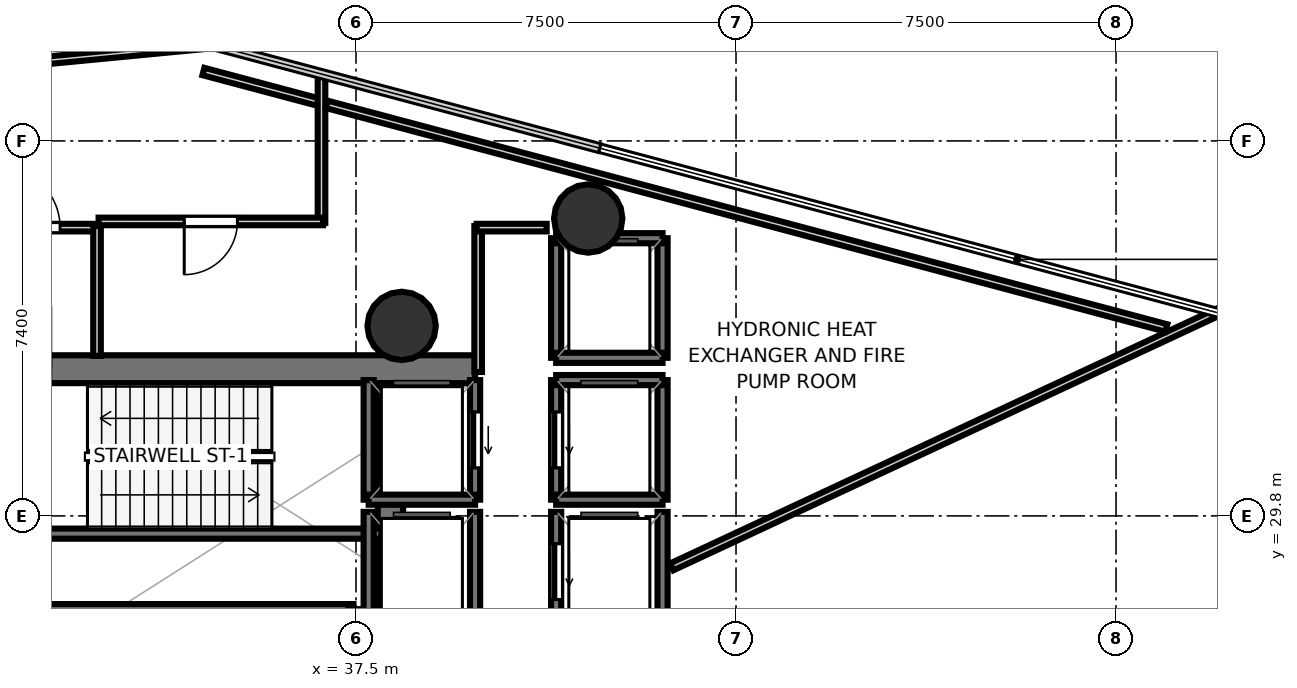
"""IFC4 building model, lengths in metres.
Left out: names, types, materials, properties, quantities, classifications, styles, units other than length and angle.
Written with IfcOpenShell. Run it as: python <this file> out.ifc"""

import sys

from ifc_helpers import new_model, si_unit, direction, frame, frame_2d, origin, origin_2d, place, context, subcontext, project, spatial, rectangle, hollow_circle, extrude, element, fill, save


model = new_model("IFC4")
c1 = context("Model", 3, precision=1e-05, world=origin(), true_north=direction((0.0, 1.0)))
c2 = subcontext(c1, "Body", "Model", "MODEL_VIEW")
j1 = project(units=[si_unit("LENGTHUNIT", "METRE"), si_unit("PLANEANGLEUNIT", "RADIAN")], contexts=[c1])
p1 = place(None, origin())
s1 = spatial("IfcSite", under=j1, at=p1, CompositionType="ELEMENT")
p2 = place(p1, origin())
s2 = spatial("IfcBuilding", under=s1, at=p2, CompositionType="ELEMENT")
p3 = place(p2, frame((0.0, 0.0, 184.6)))
s3 = spatial("IfcBuildingStorey", under=s2, at=p3, CompositionType="ELEMENT", Elevation=184.6)
p4 = place(p3, frame((29.23, 32.695, 0.0), z_axis=(0.0, 0.0, 1.0), x_axis=(1.0, 0.0, 0.0)))
e1 = element("IfcWall", 1, at=p4, inside=s3, PredefinedType="SHEAR", context=c2, shape_type="SweptSolid", body=[
    extrude(rectangle(XDim=10.62, YDim=0.55, at=frame_2d((5.31, 0.0))), origin(), (0.0, 0.0, 1.0), 4.42),
])
p5 = place(p4, frame((0.995, 0.0, 0.0)))
e2 = element("IfcOpeningElement", 2, at=p5, cuts=e1, PredefinedType="OPENING", context=c2, shape_type="SweptSolid", body=[
    extrude(rectangle(XDim=1.25, YDim=2.15, at=frame_2d((0.625, 1.075))), frame((0.0, 0.285, 0.0), z_axis=(0.0, -1.0, 0.0), x_axis=(1.0, 0.0, 0.0)), (0.0, 0.0, 1.0), 0.57),
])
p6 = place(p3, frame((38.18, 24.98, 0.0), z_axis=(0.0, 0.0, 1.0), x_axis=(0.0, 1.0, 0.0)))
e3 = element("IfcWall", 3, at=p6, inside=s3, PredefinedType="SHEAR", context=c2, shape_type="SweptSolid", body=[
    extrude(rectangle(XDim=7.44, YDim=0.5, at=frame_2d((3.72, 0.0))), origin(), (0.0, 0.0, 1.0), 4.42),
])
for number, where, z_axis, x_axis in (
    (4, (38.4, 33.55, 0.0), (0.0, 0.0, 1.0), (1.0, 0.0, 0.0)),
    (5, (42.083, 35.669, 0.0), (0.0, 0.0, 1.0), (1.0, 0.0, 0.0)),
):
    element("IfcColumn", number, at=place(p3, frame(where, z_axis=z_axis, x_axis=x_axis)), inside=s3, PredefinedType="COLUMN", context=c2, shape_type="SweptSolid", body=[
        extrude(hollow_circle(Radius=0.675, WallThickness=0.032, at=origin_2d()), origin(), (0.0, 0.0, 1.0), 4.6),
    ])
p7 = place(p3, frame((29.7, 29.45, 0.0), z_axis=(0.0, 0.0, 1.0), x_axis=(1.0, 0.0, 0.0)))
e6 = element("IfcWall", 6, at=p7, inside=s3, PredefinedType="SOLIDWALL", context=c2, shape_type="SweptSolid", body=[
    extrude(rectangle(XDim=8.3, YDim=0.2, at=frame_2d((4.15, 0.0))), origin(), (0.0, 0.0, 1.0), 4.42),
])
p8 = place(p3, frame((29.7, 27.96, 0.0), z_axis=(0.0, 0.0, 1.0), x_axis=(1.0, 0.0, 0.0)))
e7 = element("IfcWall", 7, at=p8, inside=s3, PredefinedType="SOLIDWALL", context=c2, shape_type="SweptSolid", body=[
    extrude(rectangle(XDim=7.75, YDim=0.2, at=frame_2d((3.875, 0.0))), origin(), (0.0, 0.0, 1.0), 4.42),
])
p9 = place(p3, frame((39.85, 30.12, 0.0), z_axis=(0.0, 0.0, 1.0), x_axis=(0.0, 1.0, 0.0)))
e8 = element("IfcWall", 8, at=p9, inside=s3, PredefinedType="SOLIDWALL", context=c2, shape_type="SweptSolid", body=[
    extrude(rectangle(XDim=2.36, YDim=0.2, at=frame_2d((1.18, 0.0))), origin(), (0.0, 0.0, 1.0), 4.42),
])
p10 = place(p9, frame((0.63, 0.0, 0.0)))
e9 = element("IfcOpeningElement", 9, at=p10, cuts=e8, PredefinedType="OPENING", context=c2, shape_type="SweptSolid", body=[
    extrude(rectangle(XDim=1.1, YDim=2.15, at=frame_2d((0.55, 1.075))), frame((0.0, 0.11, 0.0), z_axis=(0.0, -1.0, 0.0), x_axis=(1.0, 0.0, 0.0)), (0.0, 0.0, 1.0), 0.22),
])
p11 = place(p3, frame((37.75, 30.12, 0.0), z_axis=(0.0, 0.0, 1.0), x_axis=(0.0, 1.0, 0.0)))
e10 = element("IfcWall", 10, at=p11, inside=s3, PredefinedType="SOLIDWALL", context=c2, shape_type="SweptSolid", body=[
    extrude(rectangle(XDim=2.36, YDim=0.2, at=frame_2d((1.18, 0.0))), origin(), (0.0, 0.0, 1.0), 4.42),
])
p12 = place(p3, frame((37.75, 30.12, 0.0), z_axis=(0.0, 0.0, 1.0), x_axis=(1.0, 0.0, 0.0)))
e11 = element("IfcWall", 11, at=p12, inside=s3, PredefinedType="SOLIDWALL", context=c2, shape_type="SweptSolid", body=[
    extrude(rectangle(XDim=2.1, YDim=0.2, at=frame_2d((1.05, 0.0))), origin(), (0.0, 0.0, 1.0), 4.42),
])
p13 = place(p3, frame((43.55, 30.12, 0.0), z_axis=(0.0, 0.0, 1.0), x_axis=(0.0, 1.0, 0.0)))
e12 = element("IfcWall", 12, at=p13, inside=s3, PredefinedType="SOLIDWALL", context=c2, shape_type="SweptSolid", body=[
    extrude(rectangle(XDim=2.36, YDim=0.2, at=frame_2d((1.18, 0.0))), origin(), (0.0, 0.0, 1.0), 4.42),
])
p14 = place(p3, frame((41.45, 30.12, 0.0), z_axis=(0.0, 0.0, 1.0), x_axis=(0.0, 1.0, 0.0)))
e13 = element("IfcWall", 13, at=p14, inside=s3, PredefinedType="SOLIDWALL", context=c2, shape_type="SweptSolid", body=[
    extrude(rectangle(XDim=2.36, YDim=0.2, at=frame_2d((1.18, 0.0))), origin(), (0.0, 0.0, 1.0), 4.42),
])
p15 = place(p14, frame((0.63, 0.0, 0.0)))
e14 = element("IfcOpeningElement", 14, at=p15, cuts=e13, PredefinedType="OPENING", context=c2, shape_type="SweptSolid", body=[
    extrude(rectangle(XDim=1.1, YDim=2.15, at=frame_2d((0.55, 1.075))), frame((0.0, 0.11, 0.0), z_axis=(0.0, -1.0, 0.0), x_axis=(1.0, 0.0, 0.0)), (0.0, 0.0, 1.0), 0.22),
])
for number, where, z_axis, x_axis in (
    (15, (41.45, 32.48, 0.0), (0.0, 0.0, 1.0), (1.0, 0.0, 0.0)),
    (16, (41.45, 30.12, 0.0), (0.0, 0.0, 1.0), (1.0, 0.0, 0.0)),
):
    element("IfcWall", number, at=place(p3, frame(where, z_axis=z_axis, x_axis=x_axis)), inside=s3, PredefinedType="SOLIDWALL", context=c2, shape_type="SweptSolid", body=[
        extrude(rectangle(XDim=2.1, YDim=0.2, at=frame_2d((1.05, 0.0))), origin(), (0.0, 0.0, 1.0), 4.42),
    ])
p16 = place(p3, frame((43.55, 27.52, 0.0), z_axis=(0.0, 0.0, 1.0), x_axis=(0.0, 1.0, 0.0)))
e17 = element("IfcWall", 17, at=p16, inside=s3, PredefinedType="SOLIDWALL", context=c2, shape_type="SweptSolid", body=[
    extrude(rectangle(XDim=2.36, YDim=0.2, at=frame_2d((1.18, 0.0))), origin(), (0.0, 0.0, 1.0), 4.42),
])
p17 = place(p3, frame((41.45, 27.52, 0.0), z_axis=(0.0, 0.0, 1.0), x_axis=(0.0, 1.0, 0.0)))
e18 = element("IfcWall", 18, at=p17, inside=s3, PredefinedType="SOLIDWALL", context=c2, shape_type="SweptSolid", body=[
    extrude(rectangle(XDim=2.36, YDim=0.2, at=frame_2d((1.18, 0.0))), origin(), (0.0, 0.0, 1.0), 4.42),
])
p18 = place(p17, frame((0.63, 0.0, 0.0)))
e19 = element("IfcOpeningElement", 19, at=p18, cuts=e18, PredefinedType="OPENING", context=c2, shape_type="SweptSolid", body=[
    extrude(rectangle(XDim=1.1, YDim=2.15, at=frame_2d((0.55, 1.075))), frame((0.0, 0.11, 0.0), z_axis=(0.0, -1.0, 0.0), x_axis=(1.0, 0.0, 0.0)), (0.0, 0.0, 1.0), 0.22),
])
for number, where, z_axis, x_axis in (
    (20, (39.85, 27.52, 0.0), (0.0, 0.0, 1.0), (0.0, 1.0, 0.0)),
    (21, (37.75, 27.52, 0.0), (0.0, 0.0, 1.0), (0.0, 1.0, 0.0)),
):
    element("IfcWall", number, at=place(p3, frame(where, z_axis=z_axis, x_axis=x_axis)), inside=s3, PredefinedType="SOLIDWALL", context=c2, shape_type="SweptSolid", body=[
        extrude(rectangle(XDim=2.36, YDim=0.2, at=frame_2d((1.18, 0.0))), origin(), (0.0, 0.0, 1.0), 4.42),
    ])
for number, where, z_axis, x_axis in (
    (22, (43.55, 32.92, 0.0), (0.0, 0.0, 1.0), (0.0, 1.0, 0.0)),
    (23, (41.45, 32.92, 0.0), (0.0, 0.0, 1.0), (0.0, 1.0, 0.0)),
):
    element("IfcWall", number, at=place(p3, frame(where, z_axis=z_axis, x_axis=x_axis)), inside=s3, PredefinedType="SOLIDWALL", context=c2, shape_type="SweptSolid", body=[
        extrude(rectangle(XDim=2.36, YDim=0.2, at=frame_2d((1.18, 0.0))), origin(), (0.0, 0.0, 1.0), 4.42),
    ])
for number, where, z_axis, x_axis in (
    (24, (41.45, 35.28, 0.0), (0.0, 0.0, 1.0), (1.0, 0.0, 0.0)),
    (25, (41.45, 32.92, 0.0), (0.0, 0.0, 1.0), (1.0, 0.0, 0.0)),
):
    element("IfcWall", number, at=place(p3, frame(where, z_axis=z_axis, x_axis=x_axis)), inside=s3, PredefinedType="SOLIDWALL", context=c2, shape_type="SweptSolid", body=[
        extrude(rectangle(XDim=2.1, YDim=0.2, at=frame_2d((1.05, 0.0))), origin(), (0.0, 0.0, 1.0), 4.42),
    ])
p19 = place(p3, frame((29.7, 35.489, 0.0), z_axis=(0.0, 0.0, 1.0), x_axis=(1.0, 0.0, 0.0)))
e26 = element("IfcWall", 26, at=p19, inside=s3, PredefinedType="PARTITIONING", context=c2, shape_type="SweptSolid", body=[
    extrude(rectangle(XDim=2.72, YDim=0.15, at=frame_2d((1.36, 0.0))), origin(), (0.0, 0.0, 1.0), 2.94),
])
p20 = place(p19, frame((0.76, 0.0, 0.0)))
e27 = element("IfcOpeningElement", 27, at=p20, cuts=e26, PredefinedType="OPENING", context=c2, shape_type="SweptSolid", body=[
    extrude(rectangle(XDim=1.2, YDim=2.15, at=frame_2d((0.6, 1.075))), frame((0.0, 0.085, 0.0), z_axis=(0.0, -1.0, 0.0), x_axis=(1.0, 0.0, 0.0)), (0.0, 0.0, 1.0), 0.17),
])
p21 = place(p3, frame((32.389, 35.52, 0.0), z_axis=(0.0, 0.0, 1.0), x_axis=(0.0, -1.0, 0.0)))
e28 = element("IfcWall", 28, at=p21, inside=s3, PredefinedType="PARTITIONING", context=c2, shape_type="SweptSolid", body=[
    extrude(rectangle(XDim=2.562, YDim=0.15, at=frame_2d((1.281, 0.0))), origin(), (0.0, 0.0, 1.0), 2.94),
])
p22 = place(p3, frame((39.911, 32.64, 0.0), z_axis=(0.0, 0.0, 1.0), x_axis=(0.0, 1.0, 0.0)))
e29 = element("IfcWall", 29, at=p22, inside=s3, PredefinedType="PARTITIONING", context=c2, shape_type="SweptSolid", body=[
    extrude(rectangle(XDim=2.88, YDim=0.15, at=frame_2d((1.44, 0.0))), origin(), (0.0, 0.0, 1.0), 2.94),
])
p23 = place(p3, frame((39.88, 35.489, 0.0), z_axis=(0.0, 0.0, 1.0), x_axis=(1.0, 0.0, 0.0)))
e30 = element("IfcWall", 30, at=p23, inside=s3, PredefinedType="PARTITIONING", context=c2, shape_type="SweptSolid", body=[
    extrude(rectangle(XDim=1.383, YDim=0.15, at=frame_2d((0.691, 0.0))), origin(), (0.0, 0.0, 1.0), 2.94),
])
p24 = place(p3, frame((28.235, 38.485, 0.0), z_axis=(0.0, 0.0, 1.0), x_axis=(0.99541493838, 0.095650930208, 0.0)))
e31 = element("IfcWall", 31, at=p24, inside=s3, PredefinedType="PARTITIONING", context=c2, shape_type="SweptSolid", body=[
    extrude(rectangle(XDim=6.432, YDim=0.15, at=frame_2d((3.216, 0.0))), origin(), (0.0, 0.0, 1.0), 2.94),
])
p25 = place(p3, frame((34.488, 38.57, 0.0), z_axis=(0.0, 0.0, 1.0), x_axis=(0.966314735994, -0.257363227757, 0.0)))
e32 = element("IfcWall", 32, at=p25, inside=s3, PredefinedType="PARTITIONING", context=c2, shape_type="SweptSolid", body=[
    extrude(rectangle(XDim=2.436, YDim=0.15, at=frame_2d((1.218, 0.0))), origin(), (0.0, 0.0, 1.0), 2.94),
])
p26 = place(p3, frame((36.819, 38.54, 0.0), z_axis=(0.0, 0.0, 1.0), x_axis=(0.0, -1.0, 0.0)))
e33 = element("IfcWall", 33, at=p26, inside=s3, PredefinedType="PARTITIONING", context=c2, shape_type="SweptSolid", body=[
    extrude(rectangle(XDim=2.959, YDim=0.15, at=frame_2d((1.48, 0.0))), origin(), (0.0, 0.0, 1.0), 2.94),
])
p27 = place(p3, frame((36.85, 35.611, 0.0), z_axis=(0.0, 0.0, 1.0), x_axis=(-0.999999993926, 0.000110217127, 0.0)))
e34 = element("IfcWall", 34, at=p27, inside=s3, PredefinedType="PARTITIONING", context=c2, shape_type="SweptSolid", body=[
    extrude(rectangle(XDim=4.43, YDim=0.15, at=frame_2d((2.215, 0.0))), origin(), (0.0, 0.0, 1.0), 2.94),
])
p28 = place(p27, frame((1.69, 0.0, 0.0)))
e35 = element("IfcOpeningElement", 35, at=p28, cuts=e34, PredefinedType="OPENING", context=c2, shape_type="SweptSolid", body=[
    extrude(rectangle(XDim=1.05, YDim=2.15, at=frame_2d((0.525, 1.075))), frame((0.0, 0.085, 0.0), z_axis=(0.0, -1.0, 0.0), x_axis=(1.0, 0.0, 0.0)), (0.0, 0.0, 1.0), 0.17),
])
p29 = place(p3, frame((43.733, 28.795, 0.0), z_axis=(0.0, 0.0, 1.0), x_axis=(0.906312645593, 0.422607842376, 0.0)))
e36 = element("IfcWall", 36, at=p29, inside=s3, PredefinedType="PARTITIONING", context=c2, shape_type="SweptSolid", body=[
    extrude(rectangle(XDim=11.892, YDim=0.15, at=frame_2d((5.946, 0.0))), origin(), (0.0, 0.0, 1.0), 2.94),
])
p30 = place(p3, frame((36.922, 37.922, 0.0), z_axis=(0.0, 0.0, 1.0), x_axis=(0.966315469674, -0.257360473013, 0.0)))
e37 = element("IfcWall", 37, at=p30, inside=s3, PredefinedType="PARTITIONING", context=c2, shape_type="SweptSolid", body=[
    extrude(rectangle(XDim=17.148, YDim=0.15, at=frame_2d((8.574, 0.0))), origin(), (0.0, 0.0, 1.0), 2.94),
])
p31 = place(p10, origin())
e38 = element("IfcDoor", 38, at=p31, inside=s3, OperationType="SLIDING_TO_LEFT", PredefinedType="DOOR", context=c2, shape_type="SweptSolid", body=[
    extrude(rectangle(XDim=1.1, YDim=2.15, at=frame_2d((0.55, 1.075))), frame((0.0, 0.025, 0.0), z_axis=(0.0, -1.0, 0.0), x_axis=(1.0, 0.0, 0.0)), (0.0, 0.0, 1.0), 0.05),
])
fill(e9, e38)
p32 = place(p15, origin())
e39 = element("IfcDoor", 39, at=p32, inside=s3, OperationType="SLIDING_TO_LEFT", PredefinedType="DOOR", context=c2, shape_type="SweptSolid", body=[
    extrude(rectangle(XDim=1.1, YDim=2.15, at=frame_2d((0.55, 1.075))), frame((0.0, 0.025, 0.0), z_axis=(0.0, -1.0, 0.0), x_axis=(1.0, 0.0, 0.0)), (0.0, 0.0, 1.0), 0.05),
])
fill(e14, e39)
p33 = place(p18, origin())
e40 = element("IfcDoor", 40, at=p33, inside=s3, OperationType="SLIDING_TO_LEFT", PredefinedType="DOOR", context=c2, shape_type="SweptSolid", body=[
    extrude(rectangle(XDim=1.1, YDim=2.15, at=frame_2d((0.55, 1.075))), frame((0.0, 0.025, 0.0), z_axis=(0.0, -1.0, 0.0), x_axis=(1.0, 0.0, 0.0)), (0.0, 0.0, 1.0), 0.05),
])
fill(e19, e40)
p34 = place(p20, origin())
e41 = element("IfcDoor", 41, at=p34, inside=s3, OperationType="SINGLE_SWING_LEFT", PredefinedType="DOOR", context=c2, shape_type="SweptSolid", body=[
    extrude(rectangle(XDim=1.2, YDim=2.15, at=frame_2d((0.6, 1.075))), frame((0.0, 0.025, 0.0), z_axis=(0.0, -1.0, 0.0), x_axis=(1.0, 0.0, 0.0)), (0.0, 0.0, 1.0), 0.05),
])
fill(e27, e41)
p35 = place(p28, origin())
e42 = element("IfcDoor", 42, at=p35, inside=s3, OperationType="SINGLE_SWING_RIGHT", PredefinedType="DOOR", context=c2, shape_type="SweptSolid", body=[
    extrude(rectangle(XDim=1.05, YDim=2.15, at=frame_2d((0.525, 1.075))), frame((0.0, 0.025, 0.0), z_axis=(0.0, -1.0, 0.0), x_axis=(1.0, 0.0, 0.0)), (0.0, 0.0, 1.0), 0.05),
])
fill(e35, e42)
save(model, sys.argv[1])
